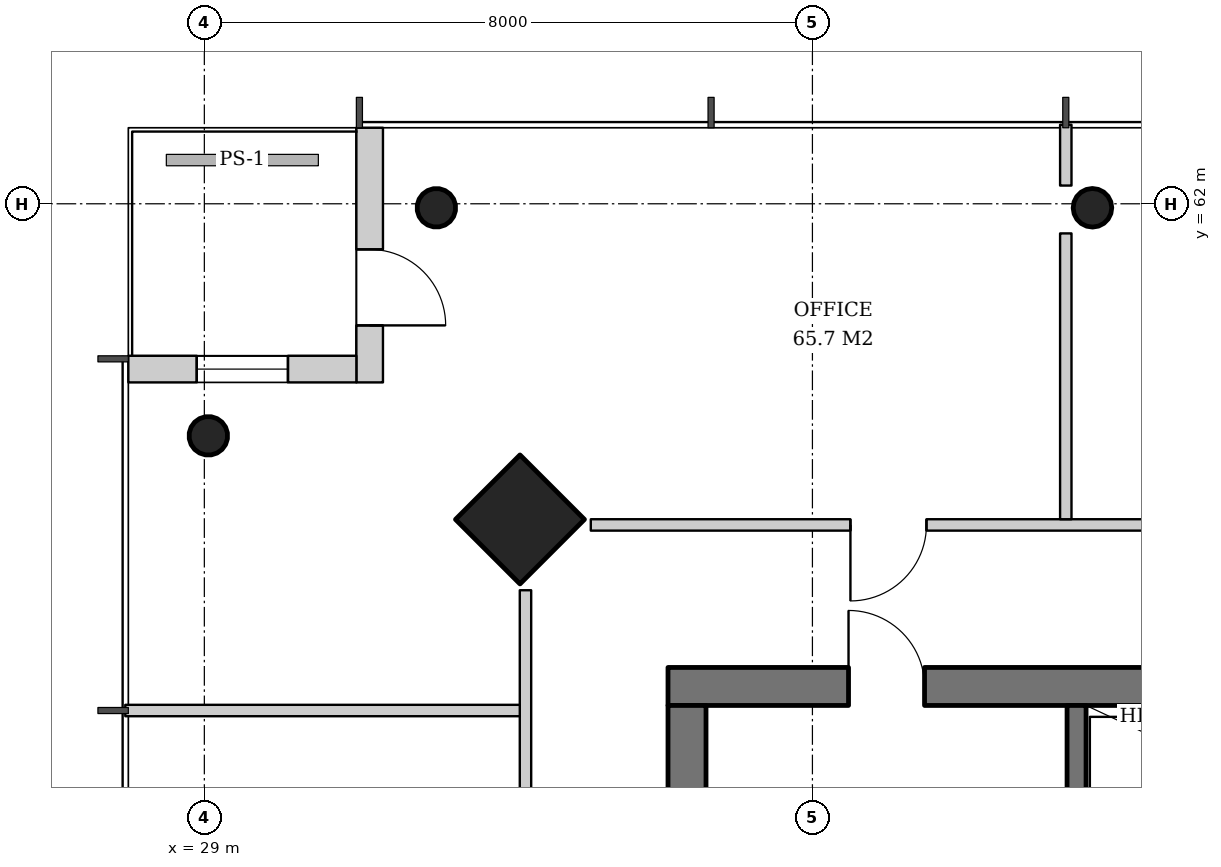
"""IFC4 building model, lengths in metres.
Left out: names, types, materials, properties, quantities, classifications, styles, units other than length and angle.
Written with IfcOpenShell. Run it as: python <this file> out.ifc"""

import sys

from ifc_helpers import new_model, si_unit, direction, frame, frame_2d, origin, origin_2d, place, context, subcontext, project, spatial, rectangle, hollow_circle, extrude, element, fill, save


model = new_model("IFC4")
c1 = context("Model", 3, precision=1e-05, world=origin(), true_north=direction((0.0, 1.0)))
c2 = subcontext(c1, "Body", "Model", "MODEL_VIEW")
j1 = project(units=[si_unit("LENGTHUNIT", "METRE"), si_unit("PLANEANGLEUNIT", "RADIAN")], contexts=[c1])
p1 = place(None, origin())
s1 = spatial("IfcSite", under=j1, at=p1, CompositionType="ELEMENT")
p2 = place(p1, origin())
s2 = spatial("IfcBuilding", under=s1, at=p2, CompositionType="ELEMENT")
p3 = place(p2, frame((0.0, 0.0, 271.8)))
s3 = spatial("IfcBuildingStorey", under=s2, at=p3, CompositionType="ELEMENT", Elevation=271.8)
p4 = place(p3, frame((33.114, 57.886, 0.0), z_axis=(0.031898107953, -0.031898107953, 0.998981992539), x_axis=(0.707106781187, 0.707106781187, 0.0)))
e1 = element("IfcColumn", 1, at=p4, inside=s3, PredefinedType="COLUMN", context=c2, shape_type="SweptSolid", body=[
    extrude(rectangle(XDim=1.2, YDim=1.2, at=origin_2d()), origin(), (0.0, 0.0, 1.0), 3.804),
])
p5 = place(p3, frame((32.014, 61.986, 0.0), z_axis=(0.031898107953, -0.031898107953, 0.998981992539), x_axis=(0.707106781187, 0.707106781187, 0.0)))
e2 = element("IfcColumn", 2, at=p5, inside=s3, PredefinedType="COLUMN", context=c2, shape_type="SweptSolid", body=[
    extrude(hollow_circle(Radius=0.254, WallThickness=0.02, at=origin_2d()), origin(), (0.0, 0.0, 1.0), 3.804),
])
p6 = place(p3, frame((40.671, 61.986, 0.0), z_axis=(0.010658915229, -0.031912535354, 0.999433828532), x_axis=(0.948492281772, 0.316800238982, 0.0)))
e3 = element("IfcColumn", 3, at=p6, inside=s3, PredefinedType="COLUMN", context=c2, shape_type="SweptSolid", body=[
    extrude(hollow_circle(Radius=0.254, WallThickness=0.02, at=origin_2d()), origin(), (0.0, 0.0, 1.0), 3.802),
])
p7 = place(p3, frame((29.014, 58.986, 0.0), z_axis=(0.031898107953, -0.031898107953, 0.998981992539), x_axis=(0.707106781187, 0.707106781187, 0.0)))
e4 = element("IfcColumn", 4, at=p7, inside=s3, PredefinedType="COLUMN", context=c2, shape_type="SweptSolid", body=[
    extrude(hollow_circle(Radius=0.254, WallThickness=0.02, at=origin_2d()), origin(), (0.0, 0.0, 1.0), 3.804),
])
p8 = place(p3, frame((35.1, 55.65, 0.0), z_axis=(0.0, 0.0, 1.0), x_axis=(1.0, 0.0, 0.0)))
e5 = element("IfcWall", 5, at=p8, inside=s3, PredefinedType="SHEAR", context=c2, shape_type="SweptSolid", body=[
    extrude(rectangle(XDim=19.8, YDim=0.5, at=frame_2d((9.9, 0.0))), origin(), (0.0, 0.0, 1.0), 3.8),
])
p9 = place(p8, frame((14.54, 0.0, 0.0)))
e6 = element("IfcOpeningElement", 6, at=p9, cuts=e5, PredefinedType="OPENING", context=c2, shape_type="SweptSolid", body=[
    extrude(rectangle(XDim=1.0, YDim=2.1, at=frame_2d((0.5, 1.05))), frame((0.0, 0.26, 0.0), z_axis=(0.0, -1.0, 0.0), x_axis=(1.0, 0.0, 0.0)), (0.0, 0.0, 1.0), 0.52),
])
p10 = place(p8, frame((2.375, 0.0, 0.0)))
e7 = element("IfcOpeningElement", 7, at=p10, cuts=e5, PredefinedType="OPENING", context=c2, shape_type="SweptSolid", body=[
    extrude(rectangle(XDim=1.0, YDim=2.1, at=frame_2d((0.5, 1.05))), frame((0.0, 0.26, 0.0), z_axis=(0.0, -1.0, 0.0), x_axis=(1.0, 0.0, 0.0)), (0.0, 0.0, 1.0), 0.52),
])
p11 = place(p3, frame((35.35, 36.6, 0.0), z_axis=(0.0, 0.0, 1.0), x_axis=(0.0, 1.0, 0.0)))
e8 = element("IfcWall", 8, at=p11, inside=s3, PredefinedType="SHEAR", context=c2, shape_type="SweptSolid", body=[
    extrude(rectangle(XDim=18.8, YDim=0.5, at=frame_2d((9.4, 0.0))), origin(), (0.0, 0.0, 1.0), 3.8),
])
p12 = place(p11, frame((8.5, 0.0, 0.0)))
e9 = element("IfcOpeningElement", 9, at=p12, cuts=e8, PredefinedType="OPENING", context=c2, shape_type="SweptSolid", body=[
    extrude(rectangle(XDim=1.8, YDim=2.4, at=frame_2d((0.9, 1.2))), frame((0.0, 0.26, 0.0), z_axis=(0.0, -1.0, 0.0), x_axis=(1.0, 0.0, 0.0)), (0.0, 0.0, 1.0), 0.52),
])
p13 = place(p3, frame((31.175, 63.0, 0.0), z_axis=(0.0, 0.0, 1.0), x_axis=(0.0, -1.0, 0.0)))
e10 = element("IfcWall", 10, at=p13, inside=s3, PredefinedType="SOLIDWALL", context=c2, shape_type="SweptSolid", body=[
    extrude(rectangle(XDim=3.35, YDim=0.35, at=frame_2d((1.675, 0.0))), origin(), (0.0, 0.0, 1.0), 3.62),
])
p14 = place(p13, frame((1.6, 0.0, 0.0)))
e11 = element("IfcOpeningElement", 11, at=p14, cuts=e10, PredefinedType="OPENING", context=c2, shape_type="SweptSolid", body=[
    extrude(rectangle(XDim=1.0, YDim=2.4, at=frame_2d((0.5, 1.2))), frame((0.0, 0.185, 0.0), z_axis=(0.0, -1.0, 0.0), x_axis=(1.0, 0.0, 0.0)), (0.0, 0.0, 1.0), 0.37),
])
p15 = place(p3, frame((31.0, 59.825, 0.0), z_axis=(0.0, 0.0, 1.0), x_axis=(-1.0, 0.0, 0.0)))
e12 = element("IfcWall", 12, at=p15, inside=s3, PredefinedType="SOLIDWALL", context=c2, shape_type="SweptSolid", body=[
    extrude(rectangle(XDim=3.0, YDim=0.35, at=frame_2d((1.5, 0.0))), origin(), (0.0, 0.0, 1.0), 3.62),
])
p16 = place(p15, frame((0.9, 0.0, 0.6)))
e13 = element("IfcOpeningElement", 13, at=p16, cuts=e12, PredefinedType="OPENING", context=c2, shape_type="SweptSolid", body=[
    extrude(rectangle(XDim=1.2, YDim=2.55, at=frame_2d((0.6, 1.275))), frame((0.0, 0.185, 0.0), z_axis=(0.0, -1.0, 0.0), x_axis=(1.0, 0.0, 0.0)), (0.0, 0.0, 1.0), 0.37),
])
p17 = place(p3, frame((40.475, 52.4, 0.0), z_axis=(0.0, 0.0, 1.0), x_axis=(0.0, 1.0, 0.0)))
e14 = element("IfcWall", 14, at=p17, inside=s3, PredefinedType="SHEAR", context=c2, shape_type="SweptSolid", body=[
    extrude(rectangle(XDim=3.0, YDim=0.25, at=frame_2d((1.5, 0.0))), origin(), (0.0, 0.0, 1.0), 3.8),
])
p18 = place(p3, frame((55.916, 57.775, 0.0), z_axis=(0.0, 0.0, 1.0), x_axis=(-1.0, 0.0, 0.0)))
e15 = element("IfcWall", 15, at=p18, inside=s3, PredefinedType="PARTITIONING", context=c2, shape_type="SweptSolid", body=[
    extrude(rectangle(XDim=21.832, YDim=0.15, at=frame_2d((10.916, 0.0))), origin(), (0.0, 0.0, 1.0), 3.02),
])
p19 = place(p18, frame((3.416, 0.0, 0.0)))
e16 = element("IfcOpeningElement", 16, at=p19, cuts=e15, PredefinedType="OPENING", context=c2, shape_type="SweptSolid", body=[
    extrude(rectangle(XDim=1.0, YDim=2.1, at=frame_2d((0.5, 1.05))), frame((0.0, 0.085, 0.0), z_axis=(0.0, -1.0, 0.0), x_axis=(1.0, 0.0, 0.0)), (0.0, 0.0, 1.0), 0.17),
])
p20 = place(p18, frame((8.083, 0.0, 0.0)))
e17 = element("IfcOpeningElement", 17, at=p20, cuts=e15, PredefinedType="OPENING", context=c2, shape_type="SweptSolid", body=[
    extrude(rectangle(XDim=1.0, YDim=2.1, at=frame_2d((0.5, 1.05))), frame((0.0, 0.085, 0.0), z_axis=(0.0, -1.0, 0.0), x_axis=(1.0, 0.0, 0.0)), (0.0, 0.0, 1.0), 0.17),
])
p21 = place(p18, frame((17.416, 0.0, 0.0)))
e18 = element("IfcOpeningElement", 18, at=p21, cuts=e15, PredefinedType="OPENING", context=c2, shape_type="SweptSolid", body=[
    extrude(rectangle(XDim=1.0, YDim=2.1, at=frame_2d((0.5, 1.05))), frame((0.0, 0.085, 0.0), z_axis=(0.0, -1.0, 0.0), x_axis=(1.0, 0.0, 0.0)), (0.0, 0.0, 1.0), 0.17),
])
p22 = place(p3, frame((40.333, 57.85, 0.0), z_axis=(0.0, 0.0, 1.0), x_axis=(0.0, 1.0, 0.0)))
e19 = element("IfcWall", 19, at=p22, inside=s3, PredefinedType="PARTITIONING", context=c2, shape_type="SweptSolid", body=[
    extrude(rectangle(XDim=3.76, YDim=0.15, at=frame_2d((1.88, 0.0))), origin(), (0.0, 0.0, 1.0), 3.62),
])
p23 = place(p3, frame((40.333, 62.24, 0.0), z_axis=(0.0, 0.0, 1.0), x_axis=(0.0, 1.0, 0.0)))
e20 = element("IfcWall", 20, at=p23, inside=s3, PredefinedType="PARTITIONING", context=c2, shape_type="SweptSolid", body=[
    extrude(rectangle(XDim=0.8, YDim=0.15, at=frame_2d((0.4, 0.0))), origin(), (0.0, 0.0, 1.0), 3.62),
])
p24 = place(p3, frame((33.225, 56.916, 0.0), z_axis=(0.0, 0.0, 1.0), x_axis=(0.0, -1.0, 0.0)))
e21 = element("IfcWall", 21, at=p24, inside=s3, PredefinedType="PARTITIONING", context=c2, shape_type="SweptSolid", body=[
    extrude(rectangle(XDim=21.832, YDim=0.15, at=frame_2d((10.916, 0.0))), origin(), (0.0, 0.0, 1.0), 3.02),
])
p25 = place(p24, frame((3.416, 0.0, 0.0)))
e22 = element("IfcOpeningElement", 22, at=p25, cuts=e21, PredefinedType="OPENING", context=c2, shape_type="SweptSolid", body=[
    extrude(rectangle(XDim=1.0, YDim=2.1, at=frame_2d((0.5, 1.05))), frame((0.0, 0.085, 0.0), z_axis=(0.0, -1.0, 0.0), x_axis=(1.0, 0.0, 0.0)), (0.0, 0.0, 1.0), 0.17),
])
p26 = place(p24, frame((8.182, 0.0, 0.0)))
e23 = element("IfcOpeningElement", 23, at=p26, cuts=e21, PredefinedType="OPENING", context=c2, shape_type="SweptSolid", body=[
    extrude(rectangle(XDim=0.8, YDim=2.1, at=frame_2d((0.4, 1.05))), frame((0.0, 0.085, 0.0), z_axis=(0.0, -1.0, 0.0), x_axis=(1.0, 0.0, 0.0)), (0.0, 0.0, 1.0), 0.17),
])
p27 = place(p24, frame((12.749, 0.0, 0.0)))
e24 = element("IfcOpeningElement", 24, at=p27, cuts=e21, PredefinedType="OPENING", context=c2, shape_type="SweptSolid", body=[
    extrude(rectangle(XDim=1.0, YDim=2.1, at=frame_2d((0.5, 1.05))), frame((0.0, 0.085, 0.0), z_axis=(0.0, -1.0, 0.0), x_axis=(1.0, 0.0, 0.0)), (0.0, 0.0, 1.0), 0.17),
])
p28 = place(p24, frame((17.516, 0.0, 0.0)))
e25 = element("IfcOpeningElement", 25, at=p28, cuts=e21, PredefinedType="OPENING", context=c2, shape_type="SweptSolid", body=[
    extrude(rectangle(XDim=0.8, YDim=2.1, at=frame_2d((0.4, 1.05))), frame((0.0, 0.085, 0.0), z_axis=(0.0, -1.0, 0.0), x_axis=(1.0, 0.0, 0.0)), (0.0, 0.0, 1.0), 0.17),
])
p29 = place(p3, frame((33.15, 55.333, 0.0), z_axis=(0.0, 0.0, 1.0), x_axis=(-1.0, 0.0, 0.0)))
e26 = element("IfcWall", 26, at=p29, inside=s3, PredefinedType="PARTITIONING", context=c2, shape_type="SweptSolid", body=[
    extrude(rectangle(XDim=5.19, YDim=0.15, at=frame_2d((2.595, 0.0))), origin(), (0.0, 0.0, 1.0), 3.12),
])
p30 = place(p14, origin())
e27 = element("IfcDoor", 27, at=p30, inside=s3, OperationType="SINGLE_SWING_RIGHT", PredefinedType="DOOR", context=c2, shape_type="SweptSolid", body=[
    extrude(rectangle(XDim=1.0, YDim=2.4, at=frame_2d((0.5, 1.2))), frame((0.0, 0.025, 0.0), z_axis=(0.0, -1.0, 0.0), x_axis=(1.0, 0.0, 0.0)), (0.0, 0.0, 1.0), 0.05),
])
fill(e11, e27)
p31 = place(p16, origin())
e28 = element("IfcWindow", 28, at=p31, inside=s3, PartitioningType="SINGLE_PANEL", PredefinedType="WINDOW", context=c2, shape_type="SweptSolid", body=[
    extrude(rectangle(XDim=1.2, YDim=2.55, at=frame_2d((0.6, 1.275))), frame((0.0, 0.03, 0.0), z_axis=(0.0, -1.0, 0.0), x_axis=(1.0, 0.0, 0.0)), (0.0, 0.0, 1.0), 0.06),
])
fill(e13, e28)
p32 = place(p10, origin())
e29 = element("IfcDoor", 29, at=p32, inside=s3, OperationType="SINGLE_SWING_LEFT", PredefinedType="DOOR", context=c2, shape_type="SweptSolid", body=[
    extrude(rectangle(XDim=1.0, YDim=2.1, at=frame_2d((0.5, 1.05))), frame((0.0, -0.19, 0.0), z_axis=(0.0, -1.0, 0.0), x_axis=(1.0, 0.0, 0.0)), (0.0, 0.0, 1.0), 0.05),
])
fill(e7, e29)
p33 = place(p21, origin())
e30 = element("IfcDoor", 30, at=p33, inside=s3, OperationType="SINGLE_SWING_RIGHT", PredefinedType="DOOR", context=c2, shape_type="SweptSolid", body=[
    extrude(rectangle(XDim=1.0, YDim=2.1, at=frame_2d((0.5, 1.05))), frame((0.0, 0.025, 0.0), z_axis=(0.0, -1.0, 0.0), x_axis=(1.0, 0.0, 0.0)), (0.0, 0.0, 1.0), 0.05),
])
fill(e18, e30)
save(model, sys.argv[1])
